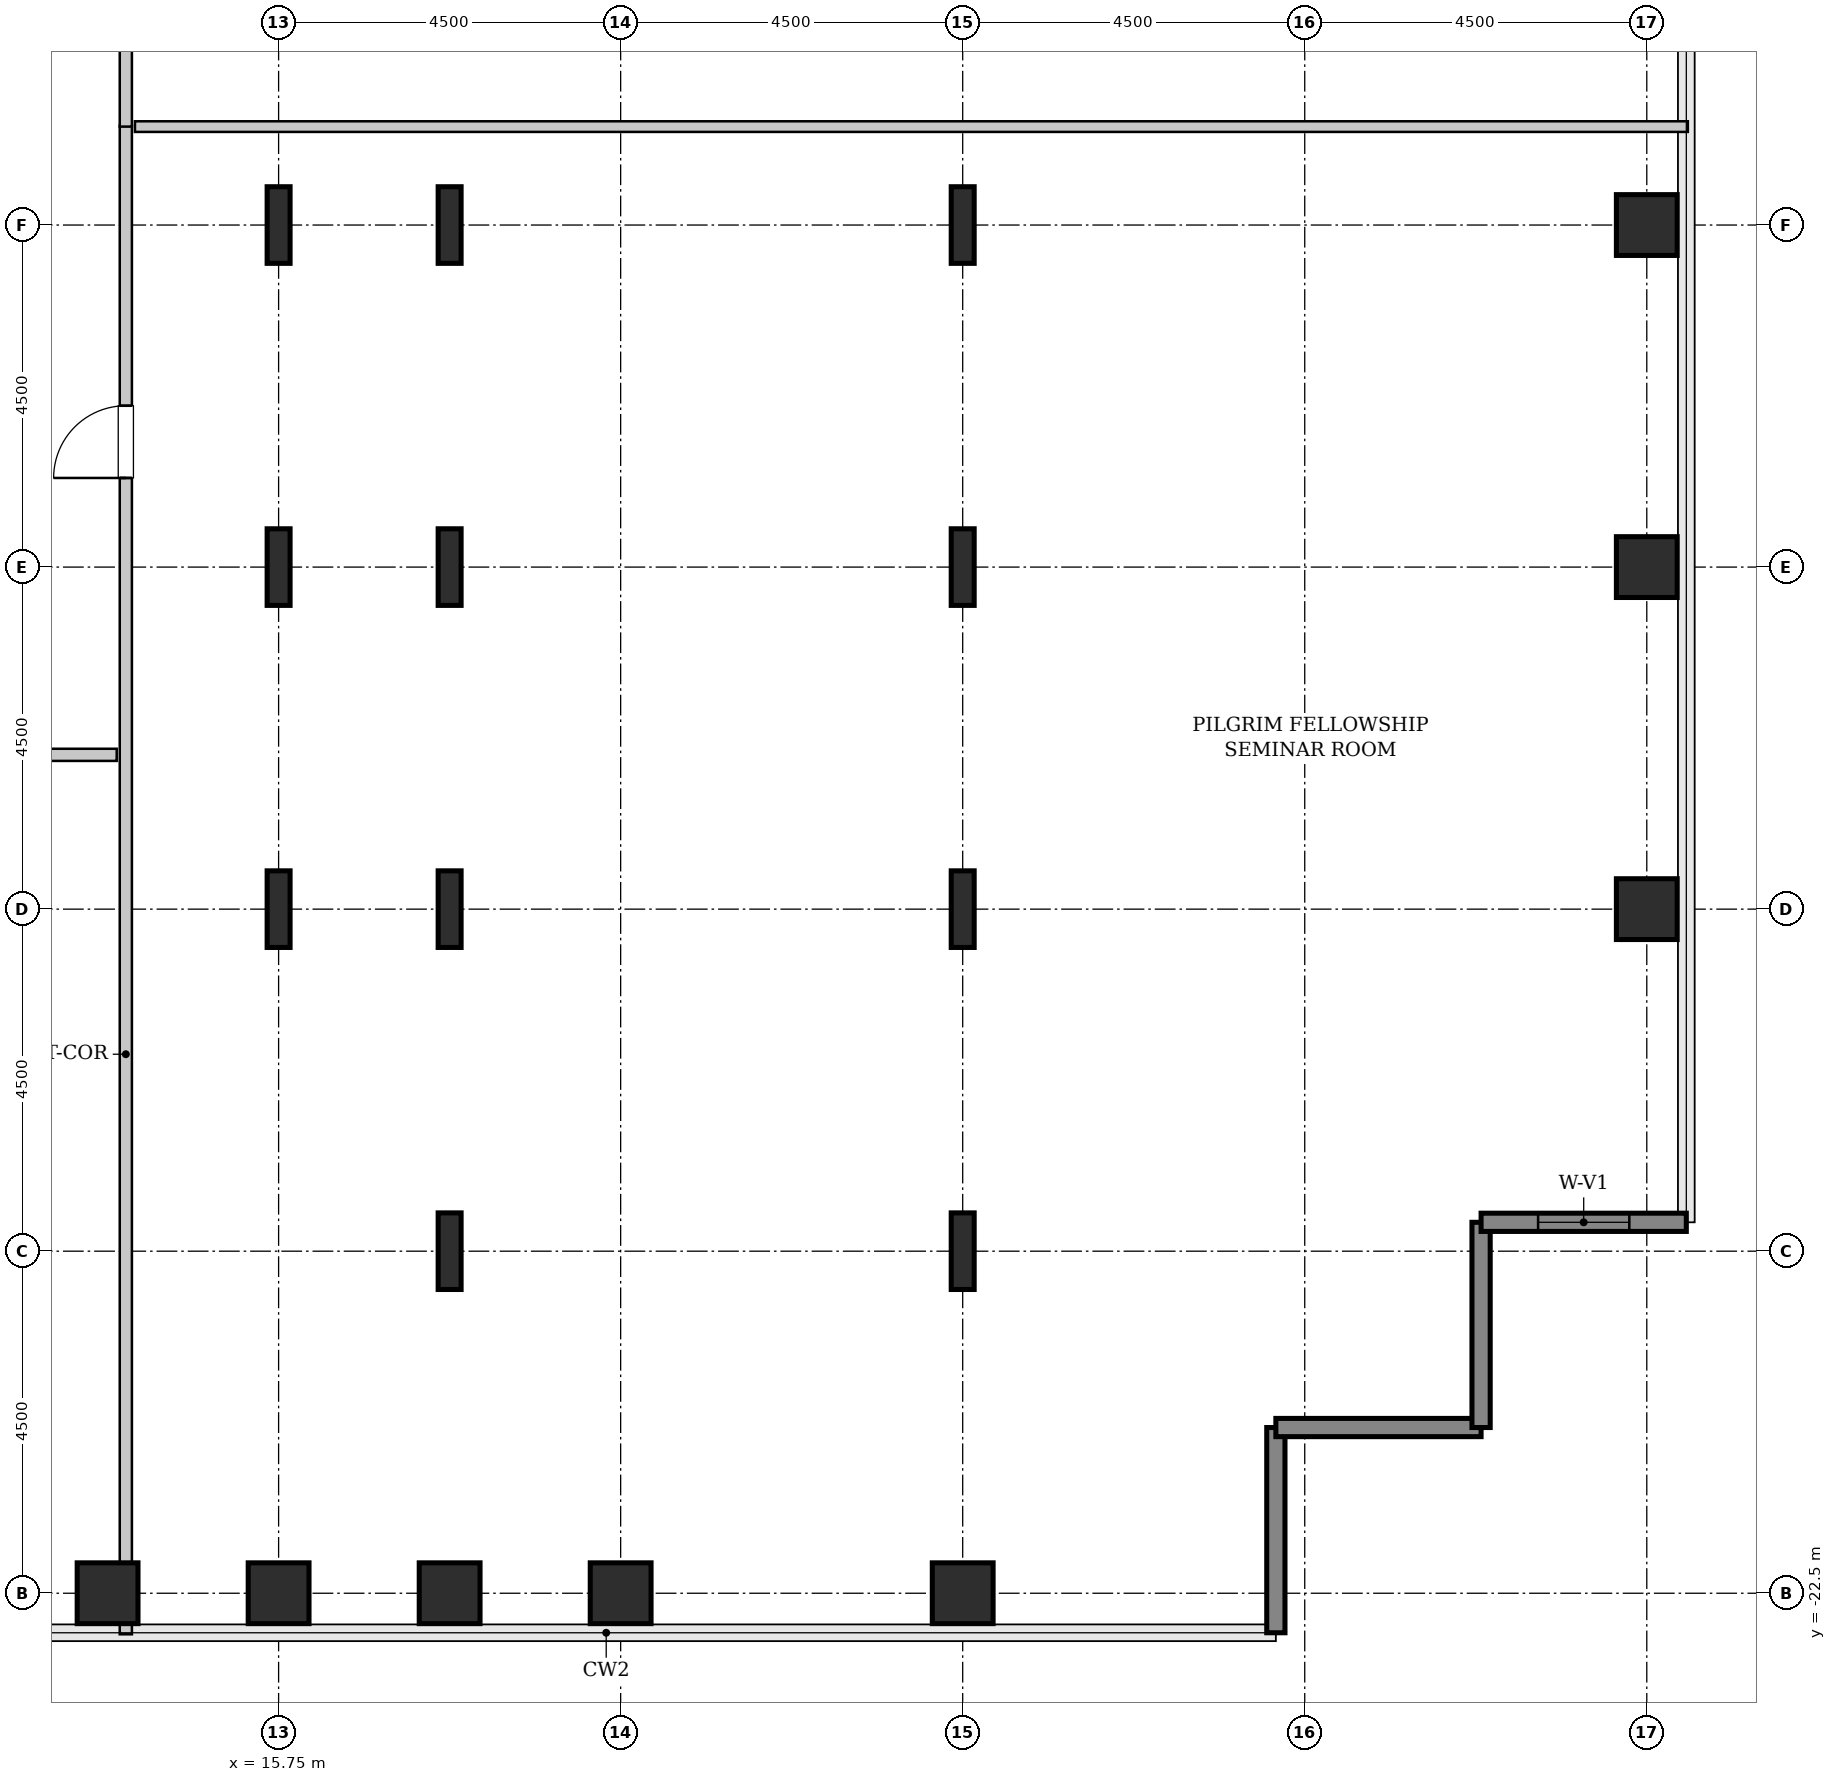
"""IFC4 building model, lengths in metres.
Left out: names, types, materials, properties, quantities, classifications, styles, units other than length and angle.
Written with IfcOpenShell. Run it as: python <this file> out.ifc"""

import sys

from ifc_helpers import new_model, si_unit, direction, frame, frame_2d, origin, origin_2d, place, context, subcontext, project, spatial, rectangle, hollow_rectangle, i_section, extrude, source, transform, mapped, element, fill, save


model = new_model("IFC4")
c1 = context("Model", 3, precision=1e-05, world=origin(), true_north=direction((0.0, 1.0)))
c2 = subcontext(c1, "Body", "Model", "MODEL_VIEW")
j1 = project(units=[si_unit("LENGTHUNIT", "METRE"), si_unit("PLANEANGLEUNIT", "RADIAN")], contexts=[c1])
p1 = place(None, origin())
s1 = spatial("IfcSite", under=j1, at=p1, CompositionType="ELEMENT")
p2 = place(p1, origin())
s2 = spatial("IfcBuilding", under=s1, at=p2, CompositionType="ELEMENT")
p3 = place(p2, frame((0.0, 0.0, 109.8)))
s3 = spatial("IfcBuildingStorey", under=s2, at=p3, CompositionType="ELEMENT", Elevation=109.8)
m1 = source(origin(), c2, "Body", "SweptSolid", [
    extrude(hollow_rectangle(XDim=0.8, YDim=0.8, WallThickness=0.04, InnerFilletRadius=0.04, OuterFilletRadius=0.08, at=origin_2d()), origin(), (0.0, 0.0, 1.0), 3.8),
])
for number, where, z_axis, x_axis in (
    (1, (13.5, -22.5, 0.0), (0.0, 0.0, 1.0), (1.0, 0.0, 0.0)),
    (2, (15.75, -22.5, 0.0), (0.0, 0.0, 1.0), (1.0, 0.0, 0.0)),
):
    element("IfcColumn", number, at=place(p3, frame(where, z_axis=z_axis, x_axis=x_axis)), inside=s3, PredefinedType="COLUMN", context=c2, shape_type="MappedRepresentation", body=[
        mapped(m1, transform((0.0, 0.0, 0.0), x_axis=(1.0, 0.0, 0.0), y_axis=(0.0, 1.0, 0.0), z_axis=(0.0, 0.0, 1.0), scale=1.0)),
    ])
m2 = source(origin(), c2, "Body", "SweptSolid", [
    extrude(i_section(OverallWidth=0.302, OverallDepth=1.008, WebThickness=0.021, FlangeThickness=0.04, FilletRadius=0.03, at=origin_2d()), origin(), (0.0, 0.0, 1.0), 3.8),
])
for number, where, z_axis, x_axis in (
    (3, (15.75, -13.5, 0.0), (0.0, 0.0, 1.0), (1.0, 0.0, 0.0)),
    (4, (15.75, -9.0, 0.0), (0.0, 0.0, 1.0), (1.0, 0.0, 0.0)),
    (5, (15.75, -4.5, 0.0), (0.0, 0.0, 1.0), (1.0, 0.0, 0.0)),
):
    element("IfcColumn", number, at=place(p3, frame(where, z_axis=z_axis, x_axis=x_axis)), inside=s3, PredefinedType="COLUMN", context=c2, shape_type="MappedRepresentation", body=[
        mapped(m2, transform((0.0, 0.0, 0.0), x_axis=(1.0, 0.0, 0.0), y_axis=(0.0, 1.0, 0.0), z_axis=(0.0, 0.0, 1.0), scale=1.0)),
    ])
p4 = place(p3, frame((18.0, -22.5, 0.0), z_axis=(0.0, 0.0, 1.0), x_axis=(1.0, 0.0, 0.0)))
e6 = element("IfcColumn", 6, at=p4, inside=s3, PredefinedType="COLUMN", context=c2, shape_type="MappedRepresentation", body=[
    mapped(m1, transform((0.0, 0.0, 0.0), x_axis=(1.0, 0.0, 0.0), y_axis=(0.0, 1.0, 0.0), z_axis=(0.0, 0.0, 1.0), scale=1.0)),
])
for number, where, z_axis, x_axis in (
    (7, (18.0, -18.0, 0.0), (0.0, 0.0, 1.0), (1.0, 0.0, 0.0)),
    (8, (18.0, -13.5, 0.0), (0.0, 0.0, 1.0), (1.0, 0.0, 0.0)),
    (9, (18.0, -9.0, 0.0), (0.0, 0.0, 1.0), (1.0, 0.0, 0.0)),
    (10, (18.0, -4.5, 0.0), (0.0, 0.0, 1.0), (1.0, 0.0, 0.0)),
):
    element("IfcColumn", number, at=place(p3, frame(where, z_axis=z_axis, x_axis=x_axis)), inside=s3, PredefinedType="COLUMN", context=c2, shape_type="MappedRepresentation", body=[
        mapped(m2, transform((0.0, 0.0, 0.0), x_axis=(1.0, 0.0, 0.0), y_axis=(0.0, 1.0, 0.0), z_axis=(0.0, 0.0, 1.0), scale=1.0)),
    ])
for number, where, z_axis, x_axis in (
    (11, (20.25, -22.5, 0.0), (0.0, 0.0, 1.0), (1.0, 0.0, 0.0)),
    (12, (24.75, -22.5, 0.0), (0.0, 0.0, 1.0), (1.0, 0.0, 0.0)),
):
    element("IfcColumn", number, at=place(p3, frame(where, z_axis=z_axis, x_axis=x_axis)), inside=s3, PredefinedType="COLUMN", context=c2, shape_type="MappedRepresentation", body=[
        mapped(m1, transform((0.0, 0.0, 0.0), x_axis=(1.0, 0.0, 0.0), y_axis=(0.0, 1.0, 0.0), z_axis=(0.0, 0.0, 1.0), scale=1.0)),
    ])
for number, where, z_axis, x_axis in (
    (13, (24.75, -18.0, 0.0), (0.0, 0.0, 1.0), (1.0, 0.0, 0.0)),
    (14, (24.75, -13.5, 0.0), (0.0, 0.0, 1.0), (1.0, 0.0, 0.0)),
    (15, (24.75, -9.0, 0.0), (0.0, 0.0, 1.0), (1.0, 0.0, 0.0)),
    (16, (24.75, -4.5, 0.0), (0.0, 0.0, 1.0), (1.0, 0.0, 0.0)),
):
    element("IfcColumn", number, at=place(p3, frame(where, z_axis=z_axis, x_axis=x_axis)), inside=s3, PredefinedType="COLUMN", context=c2, shape_type="MappedRepresentation", body=[
        mapped(m2, transform((0.0, 0.0, 0.0), x_axis=(1.0, 0.0, 0.0), y_axis=(0.0, 1.0, 0.0), z_axis=(0.0, 0.0, 1.0), scale=1.0)),
    ])
for number, where, z_axis, x_axis in (
    (17, (33.75, -13.5, 0.0), (0.0, 0.0, 1.0), (1.0, 0.0, 0.0)),
    (18, (33.75, -9.0, 0.0), (0.0, 0.0, 1.0), (1.0, 0.0, 0.0)),
    (19, (33.75, -4.5, 0.0), (0.0, 0.0, 1.0), (1.0, 0.0, 0.0)),
):
    element("IfcColumn", number, at=place(p3, frame(where, z_axis=z_axis, x_axis=x_axis)), inside=s3, PredefinedType="COLUMN", context=c2, shape_type="MappedRepresentation", body=[
        mapped(m1, transform((0.0, 0.0, 0.0), x_axis=(1.0, 0.0, 0.0), y_axis=(0.0, 1.0, 0.0), z_axis=(0.0, 0.0, 1.0), scale=1.0)),
    ])
m3 = source(origin(), c2, "Body", "SweptSolid", [
    extrude(rectangle(XDim=2.7, YDim=0.24, at=frame_2d((1.35, 0.0))), origin(), (0.0, 0.0, 1.0), 3.55),
])
for number, where, z_axis, x_axis in (
    (20, (28.87, -23.02, 0.0), (0.0, 0.0, 1.0), (0.0, 1.0, 0.0)),
    (21, (28.87, -20.32, 0.0), (0.0, 0.0, 1.0), (1.0, 0.0, 0.0)),
    (22, (31.57, -20.32, 0.0), (0.0, 0.0, 1.0), (0.0, 1.0, 0.0)),
):
    element("IfcWall", number, at=place(p3, frame(where, z_axis=z_axis, x_axis=x_axis)), inside=s3, PredefinedType="SHEAR", context=c2, shape_type="MappedRepresentation", body=[
        mapped(m3, transform((0.0, 0.0, 0.0), x_axis=(1.0, 0.0, 0.0), y_axis=(0.0, 1.0, 0.0), z_axis=(0.0, 0.0, 1.0), scale=1.0)),
    ])
p5 = place(p3, frame((31.57, -17.62, 0.0), z_axis=(0.0, 0.0, 1.0), x_axis=(1.0, 0.0, 0.0)))
e23 = element("IfcWall", 23, at=p5, inside=s3, PredefinedType="SHEAR", context=c2, shape_type="MappedRepresentation", body=[
    mapped(m3, transform((0.0, 0.0, 0.0), x_axis=(1.0, 0.0, 0.0), y_axis=(0.0, 1.0, 0.0), z_axis=(0.0, 0.0, 1.0), scale=1.0)),
])
p6 = place(p5, frame((0.75, 0.0, 0.85)))
e24 = element("IfcOpeningElement", 24, at=p6, cuts=e23, PredefinedType="OPENING", context=c2, shape_type="SweptSolid", body=[
    extrude(rectangle(XDim=1.2, YDim=1.8, at=frame_2d((0.6, 0.9))), frame((0.0, 0.13, 0.0), z_axis=(0.0, -1.0, 0.0), x_axis=(1.0, 0.0, 0.0)), (0.0, 0.0, 1.0), 0.26),
])
m4 = source(origin(), c2, "Body", "SweptSolid", [
    extrude(rectangle(XDim=19.845, YDim=0.16, at=frame_2d((9.922, 0.0))), origin(), (0.0, 0.0, 1.0), 3.535),
])
p7 = place(p3, frame((13.74, -23.04, 0.0), z_axis=(0.0, 0.0, 1.0), x_axis=(0.0, 1.0, 0.0)))
e25 = element("IfcWall", 25, at=p7, inside=s3, PredefinedType="PARTITIONING", context=c2, shape_type="MappedRepresentation", body=[
    mapped(m4, transform((0.0, 0.0, 0.0), x_axis=(1.0, 0.0, 0.0), y_axis=(0.0, 1.0, 0.0), z_axis=(0.0, 0.0, 1.0), scale=1.0)),
])
p8 = place(p7, frame((15.212, 0.0, 0.0)))
e26 = element("IfcOpeningElement", 26, at=p8, cuts=e25, PredefinedType="OPENING", context=c2, shape_type="SweptSolid", body=[
    extrude(rectangle(XDim=0.95, YDim=2.1, at=frame_2d((0.475, 1.05))), frame((0.0, 0.09, 0.0), z_axis=(0.0, -1.0, 0.0), x_axis=(1.0, 0.0, 0.0)), (0.0, 0.0, 1.0), 0.18),
])
m5 = source(origin(), c2, "Body", "SweptSolid", [
    extrude(rectangle(XDim=20.43, YDim=0.14, at=frame_2d((10.215, 0.0))), origin(), (0.0, 0.0, 1.0), 3.535),
])
p9 = place(p3, frame((13.86, -3.205, 0.0), z_axis=(0.0, 0.0, 1.0), x_axis=(1.0, 0.0, 0.0)))
e27 = element("IfcWall", 27, at=p9, inside=s3, PredefinedType="PARTITIONING", context=c2, shape_type="MappedRepresentation", body=[
    mapped(m5, transform((0.0, 0.0, 0.0), x_axis=(1.0, 0.0, 0.0), y_axis=(0.0, 1.0, 0.0), z_axis=(0.0, 0.0, 1.0), scale=1.0)),
])
m6 = source(origin(), c2, "Body", "SweptSolid", [
    extrude(rectangle(XDim=6.81, YDim=0.16, at=frame_2d((3.405, 0.0))), origin(), (0.0, 0.0, 1.0), 3.535),
])
p10 = place(p3, frame((13.74, -3.205, 0.0), z_axis=(0.0, 0.0, 1.0), x_axis=(0.0, 1.0, 0.0)))
e28 = element("IfcWall", 28, at=p10, inside=s3, PredefinedType="PARTITIONING", context=c2, shape_type="MappedRepresentation", body=[
    mapped(m6, transform((0.0, 0.0, 0.0), x_axis=(1.0, 0.0, 0.0), y_axis=(0.0, 1.0, 0.0), z_axis=(0.0, 0.0, 1.0), scale=1.0)),
])
p11 = place(p10, frame((2.93, 0.0, 0.0)))
e29 = element("IfcOpeningElement", 29, at=p11, cuts=e28, PredefinedType="OPENING", context=c2, shape_type="SweptSolid", body=[
    extrude(rectangle(XDim=0.95, YDim=2.1, at=frame_2d((0.475, 1.05))), frame((0.0, 0.09, 0.0), z_axis=(0.0, -1.0, 0.0), x_axis=(1.0, 0.0, 0.0)), (0.0, 0.0, 1.0), 0.18),
])
m7 = source(origin(), c2, "Body", "SweptSolid", [
    extrude(rectangle(XDim=4.66, YDim=0.16, at=frame_2d((2.33, 0.0))), origin(), (0.0, 0.0, 1.0), 3.535),
])
p12 = place(p3, frame((8.96, -11.47, 0.0), z_axis=(0.0, 0.0, 1.0), x_axis=(1.0, 0.0, 0.0)))
e30 = element("IfcWall", 30, at=p12, inside=s3, PredefinedType="PARTITIONING", context=c2, shape_type="MappedRepresentation", body=[
    mapped(m7, transform((0.0, 0.0, 0.0), x_axis=(1.0, 0.0, 0.0), y_axis=(0.0, 1.0, 0.0), z_axis=(0.0, 0.0, 1.0), scale=1.0)),
])
p13 = place(p12, frame((1.855, 0.0, 0.0)))
e31 = element("IfcOpeningElement", 31, at=p13, cuts=e30, PredefinedType="OPENING", context=c2, shape_type="SweptSolid", body=[
    extrude(rectangle(XDim=0.95, YDim=2.1, at=frame_2d((0.475, 1.05))), frame((0.0, 0.09, 0.0), z_axis=(0.0, -1.0, 0.0), x_axis=(1.0, 0.0, 0.0)), (0.0, 0.0, 1.0), 0.18),
])
m8 = source(origin(), c2, "Body", "SweptSolid", [
    extrude(rectangle(XDim=1.2, YDim=1.8, at=frame_2d((0.6, 0.9))), frame((0.0, 0.03, 0.0), z_axis=(0.0, -1.0, 0.0), x_axis=(1.0, 0.0, 0.0)), (0.0, 0.0, 1.0), 0.06),
])
p14 = place(p6, origin())
e32 = element("IfcWindow", 32, at=p14, inside=s3, PartitioningType="SINGLE_PANEL", PredefinedType="WINDOW", context=c2, shape_type="MappedRepresentation", body=[
    mapped(m8, transform((0.0, 0.0, 0.0), x_axis=(1.0, 0.0, 0.0), y_axis=(0.0, 1.0, 0.0), z_axis=(0.0, 0.0, 1.0), scale=1.0)),
])
fill(e24, e32)
m9 = source(origin(), c2, "Body", "SweptSolid", [
    extrude(rectangle(XDim=0.95, YDim=2.1, at=frame_2d((0.475, 1.05))), frame((0.0, 0.025, 0.0), z_axis=(0.0, -1.0, 0.0), x_axis=(1.0, 0.0, 0.0)), (0.0, 0.0, 1.0), 0.05),
])
p15 = place(p8, origin())
e33 = element("IfcDoor", 33, at=p15, inside=s3, OperationType="SINGLE_SWING_LEFT", PredefinedType="DOOR", context=c2, shape_type="MappedRepresentation", body=[
    mapped(m9, transform((0.0, 0.0, 0.0), x_axis=(1.0, 0.0, 0.0), y_axis=(0.0, 1.0, 0.0), z_axis=(0.0, 0.0, 1.0), scale=1.0)),
])
fill(e26, e33)
save(model, sys.argv[1])
